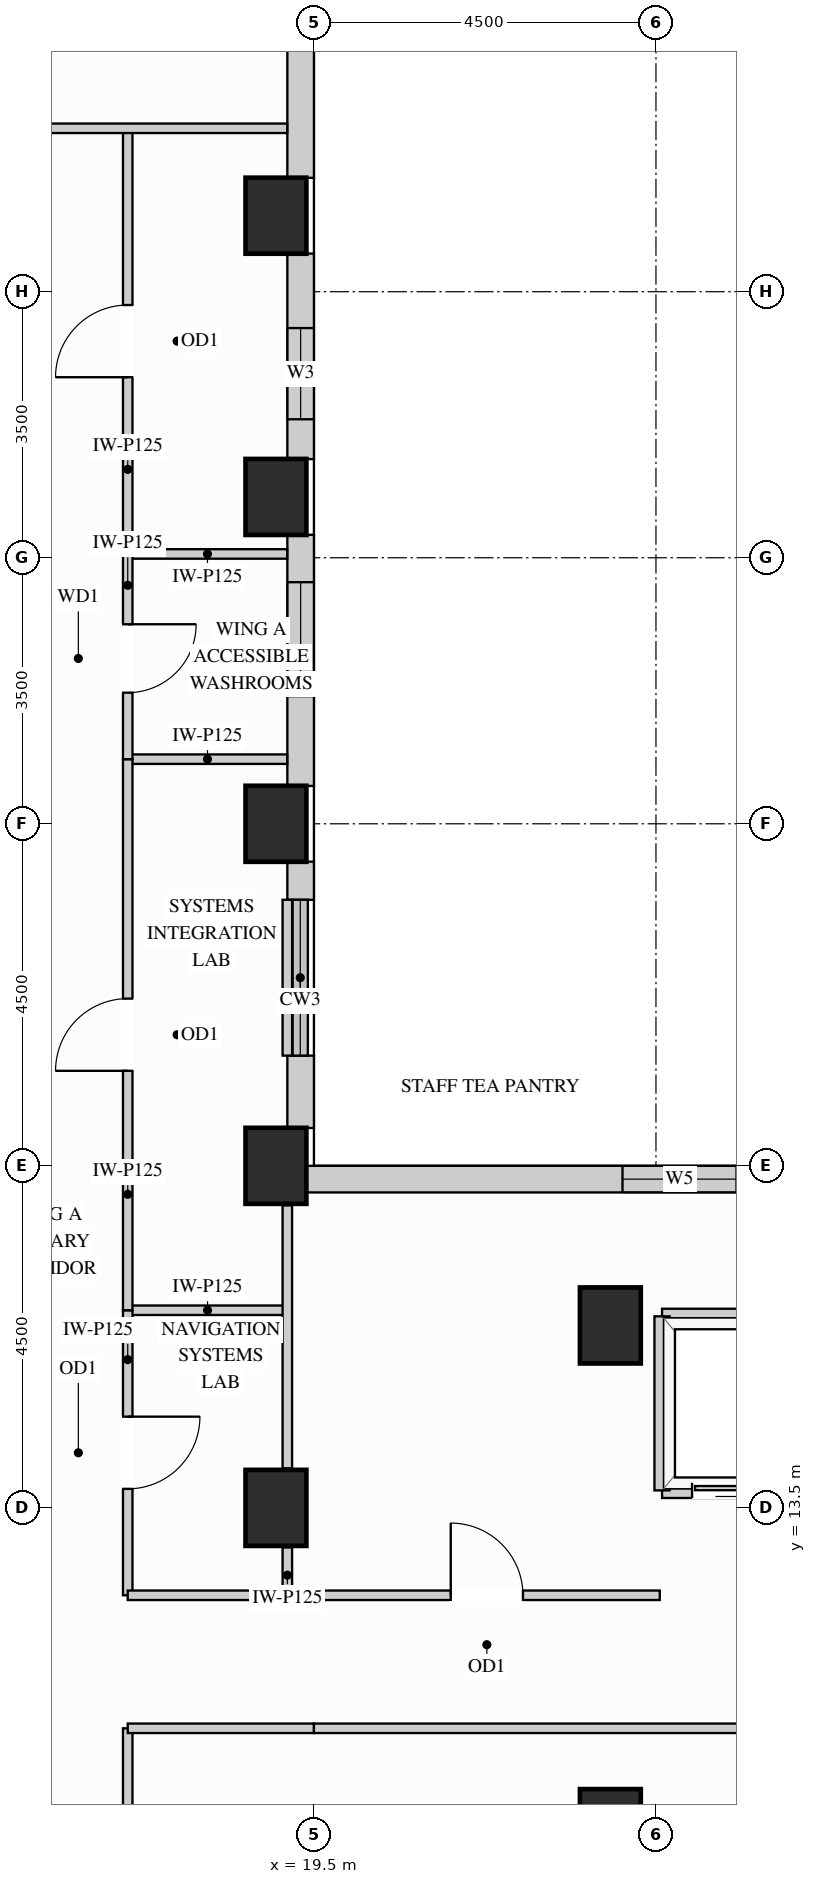
"""IFC4 building model, lengths in metres.
Left out: names, types, materials, properties, quantities, classifications, styles, units other than length and angle.
Written with IfcOpenShell. Run it as: python <this file> out.ifc"""

import sys

from ifc_helpers import new_model, si_unit, direction, frame, frame_2d, origin, origin_2d, place, context, subcontext, project, spatial, rectangle, extrude, source, transform, mapped, element, fill, save


model = new_model("IFC4")
c1 = context("Model", 3, precision=1e-05, world=origin(), true_north=direction((0.0, 1.0)))
c2 = subcontext(c1, "Body", "Model", "MODEL_VIEW")
j1 = project(units=[si_unit("LENGTHUNIT", "METRE"), si_unit("PLANEANGLEUNIT", "RADIAN")], contexts=[c1])
p1 = place(None, origin())
s1 = spatial("IfcSite", under=j1, at=p1, CompositionType="ELEMENT")
p2 = place(p1, origin())
s2 = spatial("IfcBuilding", under=s1, at=p2, CompositionType="ELEMENT")
p3 = place(p2, frame((0.0, 0.0, 168.3)))
s3 = spatial("IfcBuildingStorey", under=s2, at=p3, CompositionType="ELEMENT", Elevation=168.3)
m1 = source(origin(), c2, "Body", "SweptSolid", [
    extrude(rectangle(XDim=0.8, YDim=1.0, at=origin_2d()), origin(), (0.0, 0.0, 1.0), 3.4),
])
for number, where, z_axis, x_axis in (
    (1, (19.0, 13.5, 0.0), (0.0, 0.0, 1.0), (1.0, 0.0, 0.0)),
    (2, (19.0, 18.0, 0.0), (0.0, 0.0, 1.0), (1.0, 0.0, 0.0)),
    (3, (19.0, 22.5, 0.0), (0.0, 0.0, 1.0), (1.0, 0.0, 0.0)),
    (4, (19.0, 26.8, 0.0), (0.0, 0.0, 1.0), (1.0, 0.0, 0.0)),
    (5, (19.0, 30.5, 0.0), (0.0, 0.0, 1.0), (1.0, 0.0, 0.0)),
    (6, (23.4, 15.9, 0.0), (0.0, 0.0, 1.0), (1.0, 0.0, 0.0)),
    (7, (23.4, 9.3, 0.0), (0.0, 0.0, 1.0), (1.0, 0.0, 0.0)),
):
    element("IfcColumn", number, at=place(p3, frame(where, z_axis=z_axis, x_axis=x_axis)), inside=s3, PredefinedType="COLUMN", context=c2, shape_type="MappedRepresentation", body=[
        mapped(m1, transform((0.0, 0.0, 0.0), x_axis=(1.0, 0.0, 0.0), y_axis=(0.0, 1.0, 0.0), z_axis=(0.0, 0.0, 1.0))),
    ])
p4 = place(p3, frame((34.502, 17.825, 0.0), z_axis=(0.0, 0.0, 1.0), x_axis=(-1.0, 0.0, 0.0)))
e8 = element("IfcWall", 8, at=p4, inside=s3, PredefinedType="SOLIDWALL", context=c2, shape_type="SweptSolid", body=[
    extrude(rectangle(XDim=15.104, YDim=0.35, at=frame_2d((7.552, 0.0))), origin(), (0.0, 0.0, 1.0), 3.385),
])
p5 = place(p4, frame((4.131, 0.0, 0.78)))
e9 = element("IfcOpeningElement", 9, at=p5, cuts=e8, PredefinedType="OPENING", context=c2, shape_type="SweptSolid", body=[
    extrude(rectangle(XDim=1.5, YDim=2.0, at=frame_2d((0.75, 1.0))), frame((0.0, 0.185, 0.0), z_axis=(0.0, -1.0, 0.0), x_axis=(1.0, 0.0, 0.0)), (0.0, 0.0, 1.0), 0.37),
])
p6 = place(p4, frame((9.442, 0.0, 0.78)))
e10 = element("IfcOpeningElement", 10, at=p6, cuts=e8, PredefinedType="OPENING", context=c2, shape_type="SweptSolid", body=[
    extrude(rectangle(XDim=1.5, YDim=2.0, at=frame_2d((0.75, 1.0))), frame((0.0, 0.185, 0.0), z_axis=(0.0, -1.0, 0.0), x_axis=(1.0, 0.0, 0.0)), (0.0, 0.0, 1.0), 0.37),
])
m2 = source(origin(), c2, "Body", "SweptSolid", [
    extrude(rectangle(XDim=0.952, YDim=0.35, at=frame_2d((0.476, 0.0))), origin(), (0.0, 0.0, 1.0), 2.612),
])
p7 = place(p3, frame((19.325, 18.498, 0.0), z_axis=(0.0, 0.0, 1.0), x_axis=(0.0, 1.0, 0.0)))
e11 = element("IfcWall", 11, at=p7, inside=s3, PredefinedType="SOLIDWALL", context=c2, shape_type="MappedRepresentation", body=[
    mapped(m2, transform((0.0, 0.0, 0.0), x_axis=(1.0, 0.0, 0.0), y_axis=(0.0, 1.0, 0.0), z_axis=(0.0, 0.0, 1.0))),
])
m3 = source(origin(), c2, "Body", "SweptSolid", [
    extrude(rectangle(XDim=0.502, YDim=0.35, at=frame_2d((0.251, 0.0))), origin(), (0.0, 0.0, 1.0), 2.612),
])
p8 = place(p3, frame((19.325, 21.5, 0.0), z_axis=(0.0, 0.0, 1.0), x_axis=(0.0, 1.0, 0.0)))
e12 = element("IfcWall", 12, at=p8, inside=s3, PredefinedType="SOLIDWALL", context=c2, shape_type="MappedRepresentation", body=[
    mapped(m3, transform((0.0, 0.0, 0.0), x_axis=(1.0, 0.0, 0.0), y_axis=(0.0, 1.0, 0.0), z_axis=(0.0, 0.0, 1.0))),
])
p9 = place(p3, frame((19.325, 22.998, 0.0), z_axis=(0.0, 0.0, 1.0), x_axis=(0.0, 1.0, 0.0)))
e13 = element("IfcWall", 13, at=p9, inside=s3, PredefinedType="SOLIDWALL", context=c2, shape_type="SweptSolid", body=[
    extrude(rectangle(XDim=3.304, YDim=0.35, at=frame_2d((1.652, 0.0))), origin(), (0.0, 0.0, 1.0), 2.612),
])
p10 = place(p9, frame((1.18, 0.0, 0.78)))
e14 = element("IfcOpeningElement", 14, at=p10, cuts=e13, PredefinedType="OPENING", context=c2, shape_type="SweptSolid", body=[
    extrude(rectangle(XDim=1.5, YDim=1.652, at=frame_2d((0.75, 0.826))), frame((0.0, 0.185, 0.0), z_axis=(0.0, -1.0, 0.0), x_axis=(1.0, 0.0, 0.0)), (0.0, 0.0, 1.0), 0.37),
])
p11 = place(p3, frame((19.325, 27.298, 0.0), z_axis=(0.0, 0.0, 1.0), x_axis=(0.0, 1.0, 0.0)))
e15 = element("IfcWall", 15, at=p11, inside=s3, PredefinedType="SOLIDWALL", context=c2, shape_type="SweptSolid", body=[
    extrude(rectangle(XDim=2.704, YDim=0.35, at=frame_2d((1.352, 0.0))), origin(), (0.0, 0.0, 1.0), 2.612),
])
p12 = place(p11, frame((0.524, 0.0, 0.78)))
e16 = element("IfcOpeningElement", 16, at=p12, cuts=e15, PredefinedType="OPENING", context=c2, shape_type="SweptSolid", body=[
    extrude(rectangle(XDim=1.2, YDim=1.652, at=frame_2d((0.6, 0.826))), frame((0.0, 0.185, 0.0), z_axis=(0.0, -1.0, 0.0), x_axis=(1.0, 0.0, 0.0)), (0.0, 0.0, 1.0), 0.37),
])
m4 = source(origin(), c2, "Body", "SweptSolid", [
    extrude(rectangle(XDim=3.504, YDim=0.35, at=frame_2d((1.752, 0.0))), origin(), (0.0, 0.0, 1.0), 2.612),
])
p13 = place(p3, frame((19.325, 30.998, 0.0), z_axis=(0.0, 0.0, 1.0), x_axis=(0.0, 1.0, 0.0)))
e17 = element("IfcWall", 17, at=p13, inside=s3, PredefinedType="SOLIDWALL", context=c2, shape_type="MappedRepresentation", body=[
    mapped(m4, transform((0.0, 0.0, 0.0), x_axis=(1.0, 0.0, 0.0), y_axis=(0.0, 1.0, 0.0), z_axis=(0.0, 0.0, 1.0))),
])
m5 = source(origin(), c2, "Body", "SweptSolid", [
    extrude(rectangle(XDim=2.1, YDim=0.125, at=frame_2d((1.05, 0.0))), origin(), (0.0, 0.0, 1.0), 3.385),
])
p14 = place(p3, frame((17.05, 16.1, 0.0), z_axis=(0.0, 0.0, 1.0), x_axis=(1.0, 0.0, 0.0)))
e18 = element("IfcWall", 18, at=p14, inside=s3, PredefinedType="PARTITIONING", context=c2, shape_type="MappedRepresentation", body=[
    mapped(m5, transform((0.0, 0.0, 0.0), x_axis=(1.0, 0.0, 0.0), y_axis=(0.0, 1.0, 0.0), z_axis=(0.0, 0.0, 1.0))),
])
m6 = source(origin(), c2, "Body", "SweptSolid", [
    extrude(rectangle(XDim=2.098, YDim=0.125, at=frame_2d((1.049, 0.0))), origin(), (0.0, 0.0, 1.0), 3.385),
])
for number, where, z_axis, x_axis in (
    (19, (17.05, 23.35, 0.0), (0.0, 0.0, 1.0), (1.0, 0.0, 0.0)),
    (20, (17.05, 26.05, 0.0), (0.0, 0.0, 1.0), (1.0, 0.0, 0.0)),
):
    element("IfcWall", number, at=place(p3, frame(where, z_axis=z_axis, x_axis=x_axis)), inside=s3, PredefinedType="PARTITIONING", context=c2, shape_type="MappedRepresentation", body=[
        mapped(m6, transform((0.0, 0.0, 0.0), x_axis=(1.0, 0.0, 0.0), y_axis=(0.0, 1.0, 0.0), z_axis=(0.0, 0.0, 1.0))),
    ])
m7 = source(origin(), c2, "Body", "SweptSolid", [
    extrude(rectangle(XDim=0.63, YDim=0.125, at=frame_2d((0.315, 0.0))), origin(), (0.0, 0.0, 1.0), 2.773),
])
p15 = place(p3, frame((19.15, 12.35, 0.0), z_axis=(0.0, 0.0, 1.0), x_axis=(0.0, 1.0, 0.0)))
e21 = element("IfcWall", 21, at=p15, inside=s3, PredefinedType="PARTITIONING", context=c2, shape_type="MappedRepresentation", body=[
    mapped(m7, transform((0.0, 0.0, 0.0), x_axis=(1.0, 0.0, 0.0), y_axis=(0.0, 1.0, 0.0), z_axis=(0.0, 0.0, 1.0))),
])
m8 = source(origin(), c2, "Body", "SweptSolid", [
    extrude(rectangle(XDim=3.46, YDim=0.125, at=frame_2d((1.73, 0.0))), origin(), (0.0, 0.0, 1.0), 2.773),
])
p16 = place(p3, frame((19.15, 14.02, 0.0), z_axis=(0.0, 0.0, 1.0), x_axis=(0.0, 1.0, 0.0)))
e22 = element("IfcWall", 22, at=p16, inside=s3, PredefinedType="PARTITIONING", context=c2, shape_type="MappedRepresentation", body=[
    mapped(m8, transform((0.0, 0.0, 0.0), x_axis=(1.0, 0.0, 0.0), y_axis=(0.0, 1.0, 0.0), z_axis=(0.0, 0.0, 1.0))),
])
m9 = source(origin(), c2, "Body", "SweptSolid", [
    extrude(rectangle(XDim=2.05, YDim=0.125, at=frame_2d((1.025, 0.0))), origin(), (0.0, 0.0, 1.0), 2.612),
])
p17 = place(p3, frame((19.15, 19.45, 0.0), z_axis=(0.0, 0.0, 1.0), x_axis=(0.0, 1.0, 0.0)))
e23 = element("IfcWall", 23, at=p17, inside=s3, PredefinedType="PARTITIONING", context=c2, shape_type="MappedRepresentation", body=[
    mapped(m9, transform((0.0, 0.0, 0.0), x_axis=(1.0, 0.0, 0.0), y_axis=(0.0, 1.0, 0.0), z_axis=(0.0, 0.0, 1.0))),
])
p18 = place(p3, frame((17.05, 12.35, 0.0), z_axis=(0.0, 0.0, 1.0), x_axis=(0.0, 1.0, 0.0)))
e24 = element("IfcWall", 24, at=p18, inside=s3, PredefinedType="PARTITIONING", context=c2, shape_type="SweptSolid", body=[
    extrude(rectangle(XDim=3.75, YDim=0.125, at=frame_2d((1.875, 0.0))), origin(), (0.0, 0.0, 1.0), 3.385),
])
p19 = place(p18, frame((1.4, 0.0, 0.0)))
e25 = element("IfcOpeningElement", 25, at=p19, cuts=e24, PredefinedType="OPENING", context=c2, shape_type="SweptSolid", body=[
    extrude(rectangle(XDim=0.95, YDim=2.15, at=frame_2d((0.475, 1.075))), frame((0.0, 0.073, 0.0), z_axis=(0.0, -1.0, 0.0), x_axis=(1.0, 0.0, 0.0)), (0.0, 0.0, 1.0), 0.145),
])
p20 = place(p3, frame((17.05, 16.1, 0.0), z_axis=(0.0, 0.0, 1.0), x_axis=(0.0, 1.0, 0.0)))
e26 = element("IfcWall", 26, at=p20, inside=s3, PredefinedType="PARTITIONING", context=c2, shape_type="SweptSolid", body=[
    extrude(rectangle(XDim=7.25, YDim=0.125, at=frame_2d((3.625, 0.0))), origin(), (0.0, 0.0, 1.0), 3.385),
])
p21 = place(p20, frame((3.15, 0.0, 0.0)))
e27 = element("IfcOpeningElement", 27, at=p21, cuts=e26, PredefinedType="OPENING", context=c2, shape_type="SweptSolid", body=[
    extrude(rectangle(XDim=0.95, YDim=2.15, at=frame_2d((0.475, 1.075))), frame((0.0, 0.073, 0.0), z_axis=(0.0, -1.0, 0.0), x_axis=(1.0, 0.0, 0.0)), (0.0, 0.0, 1.0), 0.145),
])
p22 = place(p3, frame((17.05, 26.05, 0.0), z_axis=(0.0, 0.0, 1.0), x_axis=(0.0, 1.0, 0.0)))
e28 = element("IfcWall", 28, at=p22, inside=s3, PredefinedType="PARTITIONING", context=c2, shape_type="SweptSolid", body=[
    extrude(rectangle(XDim=5.6, YDim=0.125, at=frame_2d((2.8, 0.0))), origin(), (0.0, 0.0, 1.0), 3.385),
])
p23 = place(p22, frame((2.325, 0.0, 0.0)))
e29 = element("IfcOpeningElement", 29, at=p23, cuts=e28, PredefinedType="OPENING", context=c2, shape_type="SweptSolid", body=[
    extrude(rectangle(XDim=0.95, YDim=2.15, at=frame_2d((0.475, 1.075))), frame((0.0, 0.073, 0.0), z_axis=(0.0, -1.0, 0.0), x_axis=(1.0, 0.0, 0.0)), (0.0, 0.0, 1.0), 0.145),
])
p24 = place(p3, frame((17.05, 4.65, 0.0), z_axis=(0.0, 0.0, 1.0), x_axis=(0.0, 1.0, 0.0)))
e30 = element("IfcWall", 30, at=p24, inside=s3, PredefinedType="PARTITIONING", context=c2, shape_type="SweptSolid", body=[
    extrude(rectangle(XDim=5.95, YDim=0.125, at=frame_2d((2.975, 0.0))), origin(), (0.0, 0.0, 1.0), 3.385),
])
p25 = place(p24, frame((2.5, 0.0, 0.0)))
e31 = element("IfcOpeningElement", 31, at=p25, cuts=e30, PredefinedType="OPENING", context=c2, shape_type="SweptSolid", body=[
    extrude(rectangle(XDim=0.95, YDim=2.15, at=frame_2d((0.475, 1.075))), frame((0.0, 0.073, 0.0), z_axis=(0.0, -1.0, 0.0), x_axis=(1.0, 0.0, 0.0)), (0.0, 0.0, 1.0), 0.145),
])
p26 = place(p3, frame((17.05, 23.35, 0.0), z_axis=(0.0, 0.0, 1.0), x_axis=(0.0, 1.0, 0.0)))
e32 = element("IfcWall", 32, at=p26, inside=s3, PredefinedType="PARTITIONING", context=c2, shape_type="SweptSolid", body=[
    extrude(rectangle(XDim=2.7, YDim=0.125, at=frame_2d((1.35, 0.0))), origin(), (0.0, 0.0, 1.0), 3.385),
])
p27 = place(p26, frame((0.875, 0.0, 0.0)))
e33 = element("IfcOpeningElement", 33, at=p27, cuts=e32, PredefinedType="OPENING", context=c2, shape_type="SweptSolid", body=[
    extrude(rectangle(XDim=0.9, YDim=2.15, at=frame_2d((0.45, 1.075))), frame((0.0, 0.073, 0.0), z_axis=(0.0, -1.0, 0.0), x_axis=(1.0, 0.0, 0.0)), (0.0, 0.0, 1.0), 0.145),
])
m10 = source(origin(), c2, "Body", "SweptSolid", [
    extrude(rectangle(XDim=12.598, YDim=0.125, at=frame_2d((6.299, 0.0))), origin(), (0.0, 0.0, 1.0), 2.848),
])
p28 = place(p3, frame((6.55, 31.65, 0.0), z_axis=(0.0, 0.0, 1.0), x_axis=(1.0, 0.0, 0.0)))
e34 = element("IfcWall", 34, at=p28, inside=s3, PredefinedType="PARTITIONING", context=c2, shape_type="MappedRepresentation", body=[
    mapped(m10, transform((0.0, 0.0, 0.0), x_axis=(1.0, 0.0, 0.0), y_axis=(0.0, 1.0, 0.0), z_axis=(0.0, 0.0, 1.0))),
])
m11 = source(origin(), c2, "Body", "SweptSolid", [
    extrude(rectangle(XDim=2.45, YDim=0.125, at=frame_2d((1.225, 0.0))), origin(), (0.0, 0.0, 1.0), 3.385),
])
p29 = place(p3, frame((17.05, 12.35, 0.0), z_axis=(0.0, 0.0, 1.0), x_axis=(1.0, 0.0, 0.0)))
e35 = element("IfcWall", 35, at=p29, inside=s3, PredefinedType="PARTITIONING", context=c2, shape_type="MappedRepresentation", body=[
    mapped(m11, transform((0.0, 0.0, 0.0), x_axis=(1.0, 0.0, 0.0), y_axis=(0.0, 1.0, 0.0), z_axis=(0.0, 0.0, 1.0))),
])
p30 = place(p3, frame((19.5, 12.35, 0.0), z_axis=(0.0, 0.0, 1.0), x_axis=(1.0, 0.0, 0.0)))
e36 = element("IfcWall", 36, at=p30, inside=s3, PredefinedType="PARTITIONING", context=c2, shape_type="SweptSolid", body=[
    extrude(rectangle(XDim=4.55, YDim=0.125, at=frame_2d((2.275, 0.0))), origin(), (0.0, 0.0, 1.0), 3.385),
])
p31 = place(p30, frame((1.8, 0.0, 0.0)))
e37 = element("IfcOpeningElement", 37, at=p31, cuts=e36, PredefinedType="OPENING", context=c2, shape_type="SweptSolid", body=[
    extrude(rectangle(XDim=0.95, YDim=2.15, at=frame_2d((0.475, 1.075))), frame((0.0, 0.073, 0.0), z_axis=(0.0, -1.0, 0.0), x_axis=(1.0, 0.0, 0.0)), (0.0, 0.0, 1.0), 0.145),
])
p32 = place(p3, frame((17.05, 10.6, 0.0), z_axis=(0.0, 0.0, 1.0), x_axis=(1.0, 0.0, 0.0)))
e38 = element("IfcWall", 38, at=p32, inside=s3, PredefinedType="PARTITIONING", context=c2, shape_type="MappedRepresentation", body=[
    mapped(m11, transform((0.0, 0.0, 0.0), x_axis=(1.0, 0.0, 0.0), y_axis=(0.0, 1.0, 0.0), z_axis=(0.0, 0.0, 1.0))),
])
p33 = place(p3, frame((19.5, 10.6, 0.0), z_axis=(0.0, 0.0, 1.0), x_axis=(1.0, 0.0, 0.0)))
e39 = element("IfcWall", 39, at=p33, inside=s3, PredefinedType="PARTITIONING", context=c2, shape_type="SweptSolid", body=[
    extrude(rectangle(XDim=14.9, YDim=0.125, at=frame_2d((7.45, 0.0))), origin(), (0.0, 0.0, 1.0), 3.385),
])
p34 = place(p33, frame((6.975, 0.0, 0.0)))
e40 = element("IfcOpeningElement", 40, at=p34, cuts=e39, PredefinedType="OPENING", context=c2, shape_type="SweptSolid", body=[
    extrude(rectangle(XDim=0.95, YDim=2.15, at=frame_2d((0.475, 1.075))), frame((0.0, 0.073, 0.0), z_axis=(0.0, -1.0, 0.0), x_axis=(1.0, 0.0, 0.0)), (0.0, 0.0, 1.0), 0.145),
])
m12 = source(origin(), c2, "Body", "SweptSolid", [
    extrude(rectangle(XDim=1.89, YDim=0.2, at=frame_2d((0.945, 0.0))), origin(), (0.0, 0.0, 1.0), 2.773),
])
p35 = place(p3, frame((24.08, 16.02, 0.0), z_axis=(0.0, 0.0, 1.0), x_axis=(1.0, 0.0, 0.0)))
e41 = element("IfcWall", 41, at=p35, inside=s3, PredefinedType="PARTITIONING", context=c2, shape_type="MappedRepresentation", body=[
    mapped(m12, transform((0.0, 0.0, 0.0), x_axis=(1.0, 0.0, 0.0), y_axis=(0.0, 1.0, 0.0), z_axis=(0.0, 0.0, 1.0))),
])
p36 = place(p3, frame((24.08, 13.73, 0.0), z_axis=(0.0, 0.0, 1.0), x_axis=(1.0, 0.0, 0.0)))
e42 = element("IfcWall", 42, at=p36, inside=s3, PredefinedType="PARTITIONING", context=c2, shape_type="SweptSolid", body=[
    extrude(rectangle(XDim=1.89, YDim=0.2, at=frame_2d((0.945, 0.0))), origin(), (0.0, 0.0, 1.0), 2.466),
])
p37 = place(p36, frame((0.395, 0.0, 0.0)))
e43 = element("IfcOpeningElement", 43, at=p37, cuts=e42, PredefinedType="OPENING", context=c2, shape_type="SweptSolid", body=[
    extrude(rectangle(XDim=1.1, YDim=2.2, at=frame_2d((0.55, 1.1))), frame((0.0, 0.11, 0.0), z_axis=(0.0, -1.0, 0.0), x_axis=(1.0, 0.0, 0.0)), (0.0, 0.0, 1.0), 0.22),
])
m13 = source(origin(), c2, "Body", "SweptSolid", [
    extrude(rectangle(XDim=2.29, YDim=0.2, at=frame_2d((1.145, 0.0))), origin(), (0.0, 0.0, 1.0), 3.385),
])
p38 = place(p3, frame((24.08, 13.73, 0.0), z_axis=(0.0, 0.0, 1.0), x_axis=(0.0, 1.0, 0.0)))
e44 = element("IfcWall", 44, at=p38, inside=s3, PredefinedType="PARTITIONING", context=c2, shape_type="MappedRepresentation", body=[
    mapped(m13, transform((0.0, 0.0, 0.0), x_axis=(1.0, 0.0, 0.0), y_axis=(0.0, 1.0, 0.0), z_axis=(0.0, 0.0, 1.0))),
])
m14 = source(origin(), c2, "Body", "SweptSolid", [
    extrude(rectangle(XDim=1.1, YDim=2.2, at=frame_2d((0.55, 1.1))), frame((0.0, 0.025, 0.0), z_axis=(0.0, -1.0, 0.0), x_axis=(1.0, 0.0, 0.0)), (0.0, 0.0, 1.0), 0.05),
])
p39 = place(p37, origin())
e45 = element("IfcDoor", 45, at=p39, inside=s3, OperationType="SLIDING_TO_LEFT", PredefinedType="DOOR", context=c2, shape_type="MappedRepresentation", body=[
    mapped(m14, transform((0.0, 0.0, 0.0), x_axis=(1.0, 0.0, 0.0), y_axis=(0.0, 1.0, 0.0), z_axis=(0.0, 0.0, 1.0))),
])
fill(e43, e45)
m15 = source(origin(), c2, "Body", "SweptSolid", [
    extrude(rectangle(XDim=0.95, YDim=2.15, at=frame_2d((0.475, 1.075))), frame((0.0, 0.025, 0.0), z_axis=(0.0, -1.0, 0.0), x_axis=(1.0, 0.0, 0.0)), (0.0, 0.0, 1.0), 0.05),
])
p40 = place(p19, origin())
e46 = element("IfcDoor", 46, at=p40, inside=s3, OperationType="SINGLE_SWING_RIGHT", PredefinedType="DOOR", context=c2, shape_type="MappedRepresentation", body=[
    mapped(m15, transform((0.0, 0.0, 0.0), x_axis=(1.0, 0.0, 0.0), y_axis=(0.0, 1.0, 0.0), z_axis=(0.0, 0.0, 1.0))),
])
fill(e25, e46)
p41 = place(p21, origin())
e47 = element("IfcDoor", 47, at=p41, inside=s3, OperationType="SINGLE_SWING_LEFT", PredefinedType="DOOR", context=c2, shape_type="MappedRepresentation", body=[
    mapped(m15, transform((0.0, 0.0, 0.0), x_axis=(1.0, 0.0, 0.0), y_axis=(0.0, 1.0, 0.0), z_axis=(0.0, 0.0, 1.0))),
])
fill(e27, e47)
p42 = place(p23, origin())
e48 = element("IfcDoor", 48, at=p42, inside=s3, OperationType="SINGLE_SWING_LEFT", PredefinedType="DOOR", context=c2, shape_type="MappedRepresentation", body=[
    mapped(m15, transform((0.0, 0.0, 0.0), x_axis=(1.0, 0.0, 0.0), y_axis=(0.0, 1.0, 0.0), z_axis=(0.0, 0.0, 1.0))),
])
fill(e29, e48)
p43 = place(p31, origin())
e49 = element("IfcDoor", 49, at=p43, inside=s3, OperationType="SINGLE_SWING_LEFT", PredefinedType="DOOR", context=c2, shape_type="MappedRepresentation", body=[
    mapped(m15, transform((0.0, 0.0, 0.0), x_axis=(1.0, 0.0, 0.0), y_axis=(0.0, 1.0, 0.0), z_axis=(0.0, 0.0, 1.0))),
])
fill(e37, e49)
m16 = source(origin(), c2, "Body", "SweptSolid", [
    extrude(rectangle(XDim=0.9, YDim=2.15, at=frame_2d((0.45, 1.075))), frame((0.0, 0.025, 0.0), z_axis=(0.0, -1.0, 0.0), x_axis=(1.0, 0.0, 0.0)), (0.0, 0.0, 1.0), 0.05),
])
p44 = place(p27, origin())
e50 = element("IfcDoor", 50, at=p44, inside=s3, OperationType="SINGLE_SWING_RIGHT", PredefinedType="DOOR", context=c2, shape_type="MappedRepresentation", body=[
    mapped(m16, transform((0.0, 0.0, 0.0), x_axis=(1.0, 0.0, 0.0), y_axis=(0.0, 1.0, 0.0), z_axis=(0.0, 0.0, 1.0))),
])
fill(e33, e50)
m17 = source(origin(), c2, "Body", "SweptSolid", [
    extrude(rectangle(XDim=1.2, YDim=1.652, at=frame_2d((0.6, 0.826))), frame((0.0, 0.03, 0.0), z_axis=(0.0, -1.0, 0.0), x_axis=(1.0, 0.0, 0.0)), (0.0, 0.0, 1.0), 0.06),
])
p45 = place(p12, origin())
e51 = element("IfcWindow", 51, at=p45, inside=s3, PartitioningType="SINGLE_PANEL", PredefinedType="WINDOW", context=c2, shape_type="MappedRepresentation", body=[
    mapped(m17, transform((0.0, 0.0, 0.0), x_axis=(1.0, 0.0, 0.0), y_axis=(0.0, 1.0, 0.0), z_axis=(0.0, 0.0, 1.0))),
])
fill(e16, e51)
m18 = source(origin(), c2, "Body", "SweptSolid", [
    extrude(rectangle(XDim=1.5, YDim=2.0, at=frame_2d((0.75, 1.0))), frame((0.0, 0.03, 0.0), z_axis=(0.0, -1.0, 0.0), x_axis=(1.0, 0.0, 0.0)), (0.0, 0.0, 1.0), 0.06),
])
p46 = place(p6, origin())
e52 = element("IfcWindow", 52, at=p46, inside=s3, PartitioningType="SINGLE_PANEL", PredefinedType="WINDOW", context=c2, shape_type="MappedRepresentation", body=[
    mapped(m18, transform((0.0, 0.0, 0.0), x_axis=(1.0, 0.0, 0.0), y_axis=(0.0, 1.0, 0.0), z_axis=(0.0, 0.0, 1.0))),
])
fill(e10, e52)
m19 = source(origin(), c2, "Body", "SweptSolid", [
    extrude(rectangle(XDim=1.5, YDim=1.652, at=frame_2d((0.75, 0.826))), frame((0.0, 0.03, 0.0), z_axis=(0.0, -1.0, 0.0), x_axis=(1.0, 0.0, 0.0)), (0.0, 0.0, 1.0), 0.06),
])
p47 = place(p10, origin())
e53 = element("IfcWindow", 53, at=p47, inside=s3, PartitioningType="SINGLE_PANEL", PredefinedType="WINDOW", context=c2, shape_type="MappedRepresentation", body=[
    mapped(m19, transform((0.0, 0.0, 0.0), x_axis=(1.0, 0.0, 0.0), y_axis=(0.0, 1.0, 0.0), z_axis=(0.0, 0.0, 1.0))),
])
fill(e14, e53)
save(model, sys.argv[1])
